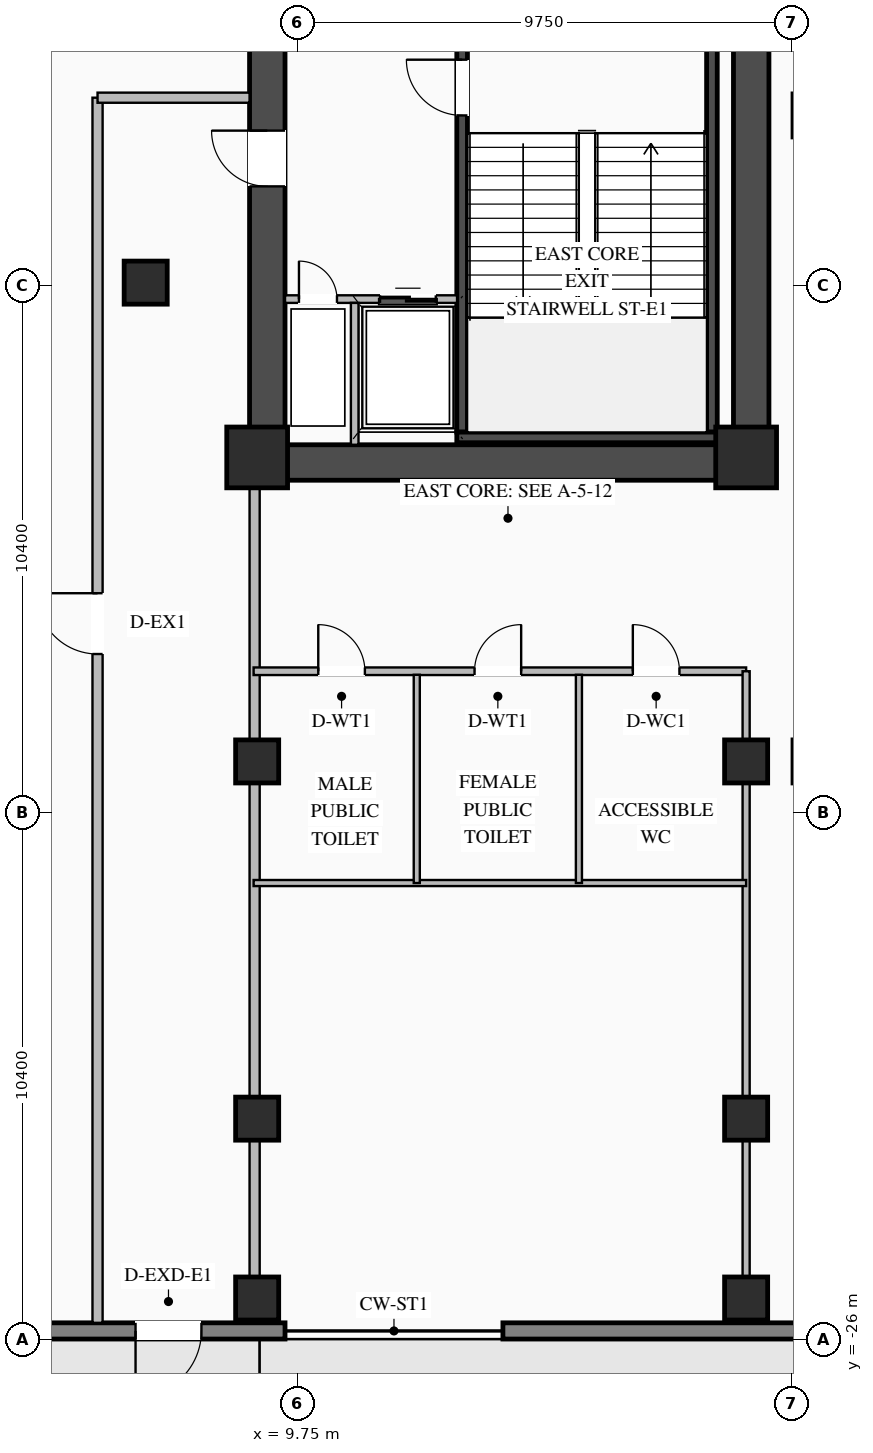
"""IFC4 building model, lengths in metres.
Left out: names, types, materials, properties, quantities, classifications, styles, units other than length and angle.
Written with IfcOpenShell. Run it as: python <this file> out.ifc"""

import sys

from ifc_helpers import new_model, si_unit, direction, frame, frame_2d, origin, origin_2d, place, context, subcontext, project, spatial, rectangle, i_section, extrude, element, fill, save


model = new_model("IFC4")
c1 = context("Model", 3, precision=1e-05, world=origin(), true_north=direction((0.0, 1.0)))
c2 = subcontext(c1, "Body", "Model", "MODEL_VIEW")
j1 = project(units=[si_unit("LENGTHUNIT", "METRE"), si_unit("PLANEANGLEUNIT", "RADIAN")], contexts=[c1])
p1 = place(None, origin())
s1 = spatial("IfcSite", under=j1, at=p1, CompositionType="ELEMENT")
p2 = place(p1, origin())
s2 = spatial("IfcBuilding", under=s1, at=p2, CompositionType="ELEMENT")
p3 = place(p2, origin())
s3 = spatial("IfcBuildingStorey", under=s2, at=p3, CompositionType="ELEMENT", Elevation=0.0)
p4 = place(p3, frame((8.8, -8.7, 0.0), z_axis=(0.0, 0.0, 1.0), x_axis=(1.0, 0.0, 0.0)))
e1 = element("IfcWall", 1, at=p4, inside=s3, PredefinedType="SHEAR", context=c2, shape_type="SweptSolid", body=[
    extrude(rectangle(XDim=10.25, YDim=0.7, at=frame_2d((5.125, 0.0))), origin(), (0.0, 0.0, 1.0), 4.85),
])
p5 = place(p3, frame((9.15, -8.35, 0.0), z_axis=(0.0, 0.0, 1.0), x_axis=(0.0, 1.0, 0.0)))
e2 = element("IfcWall", 2, at=p5, inside=s3, PredefinedType="SHEAR", context=c2, shape_type="SweptSolid", body=[
    extrude(rectangle(XDim=16.7, YDim=0.7, at=frame_2d((8.35, 0.0))), origin(), (0.0, 0.0, 1.0), 4.85),
])
p6 = place(p5, frame((5.1, 0.0, 0.0)))
e3 = element("IfcOpeningElement", 3, at=p6, cuts=e2, PredefinedType="OPENING", context=c2, shape_type="SweptSolid", body=[
    extrude(rectangle(XDim=1.1, YDim=2.08, at=frame_2d((0.55, 1.04))), frame((0.0, 0.36, 0.0), z_axis=(0.0, -1.0, 0.0), x_axis=(1.0, 0.0, 0.0)), (0.0, 0.0, 1.0), 0.72),
])
p7 = place(p3, frame((18.7, -8.35, 0.0), z_axis=(0.0, 0.0, 1.0), x_axis=(0.0, 1.0, 0.0)))
e4 = element("IfcWall", 4, at=p7, inside=s3, PredefinedType="SHEAR", context=c2, shape_type="SweptSolid", body=[
    extrude(rectangle(XDim=16.7, YDim=0.7, at=frame_2d((8.35, 0.0))), origin(), (0.0, 0.0, 1.0), 4.85),
])
p8 = place(p3, frame((12.995, -8.1, 0.0), z_axis=(0.0, 0.0, 1.0), x_axis=(0.0, 1.0, 0.0)))
e5 = element("IfcWall", 5, at=p8, inside=s3, PredefinedType="SHEAR", context=c2, shape_type="SweptSolid", body=[
    extrude(rectangle(XDim=8.2, YDim=0.21, at=frame_2d((4.1, 0.0))), origin(), (0.0, 0.0, 1.0), 4.85),
])
p9 = place(p8, frame((6.25, 0.0, 0.0)))
e6 = element("IfcOpeningElement", 6, at=p9, cuts=e5, PredefinedType="OPENING", context=c2, shape_type="SweptSolid", body=[
    extrude(rectangle(XDim=1.1, YDim=2.15, at=frame_2d((0.55, 1.075))), frame((0.0, 0.115, 0.0), z_axis=(0.0, -1.0, 0.0), x_axis=(1.0, 0.0, 0.0)), (0.0, 0.0, 1.0), 0.23),
])
p10 = place(p3, frame((17.925, -8.1, 0.0), z_axis=(0.0, 0.0, 1.0), x_axis=(0.0, 1.0, 0.0)))
e7 = element("IfcWall", 7, at=p10, inside=s3, PredefinedType="SHEAR", context=c2, shape_type="SweptSolid", body=[
    extrude(rectangle(XDim=8.2, YDim=0.21, at=frame_2d((4.1, 0.0))), origin(), (0.0, 0.0, 1.0), 4.85),
])
p11 = place(p3, frame((12.89, -8.205, 0.0), z_axis=(0.0, 0.0, 1.0), x_axis=(1.0, 0.0, 0.0)))
e8 = element("IfcWall", 8, at=p11, inside=s3, PredefinedType="SHEAR", context=c2, shape_type="SweptSolid", body=[
    extrude(rectangle(XDim=5.14, YDim=0.21, at=frame_2d((2.57, 0.0))), origin(), (0.0, 0.0, 1.0), 4.85),
])
for number, where, z_axis, x_axis in (
    (9, (8.95, -8.6, 0.0), (0.0, 0.0, 1.0), (1.0, 0.0, 0.0)),
    (10, (18.6, -8.6, 0.0), (0.0, 0.0, 1.0), (1.0, 0.0, 0.0)),
):
    element("IfcColumn", number, at=place(p3, frame(where, z_axis=z_axis, x_axis=x_axis)), inside=s3, PredefinedType="COLUMN", context=c2, shape_type="SweptSolid", body=[
        extrude(rectangle(XDim=1.2, YDim=1.2, at=origin_2d()), origin(), (0.0, 0.0, 1.0), 5.1),
    ])
for number, where, z_axis, x_axis in (
    (11, (6.75, -5.15, 0.0), (0.0, 0.0, 1.0), (1.0, 0.0, 0.0)),
    (12, (8.95, -14.6, 0.0), (0.0, 0.0, 1.0), (1.0, 0.0, 0.0)),
    (13, (18.6, -14.6, 0.0), (0.0, 0.0, 1.0), (1.0, 0.0, 0.0)),
    (14, (19.95, -14.6, 0.0), (0.0, 0.0, 1.0), (1.0, 0.0, 0.0)),
    (15, (19.95, -1.85, 0.0), (0.0, 0.0, 1.0), (1.0, 0.0, 0.0)),
    (16, (8.95, -21.65, 0.0), (0.0, 0.0, 1.0), (1.0, 0.0, 0.0)),
    (17, (18.6, -21.65, 0.0), (0.0, 0.0, 1.0), (1.0, 0.0, 0.0)),
    (18, (8.95, -25.2, 0.0), (0.0, 0.0, 1.0), (1.0, 0.0, 0.0)),
    (19, (18.6, -25.2, 0.0), (0.0, 0.0, 1.0), (1.0, 0.0, 0.0)),
):
    element("IfcColumn", number, at=place(p3, frame(where, z_axis=z_axis, x_axis=x_axis)), inside=s3, PredefinedType="COLUMN", context=c2, shape_type="SweptSolid", body=[
        extrude(i_section(OverallWidth=0.85, OverallDepth=0.85, WebThickness=0.032, FlangeThickness=0.048, at=origin_2d()), origin(), (0.0, 0.0, 1.0), 5.1),
    ])
p12 = place(p3, frame((38.68, -25.84, 0.0), z_axis=(0.0, 0.0, 1.0), x_axis=(-1.0, 0.0, 0.0)))
e20 = element("IfcWall", 20, at=p12, inside=s3, PredefinedType="STANDARD", context=c2, shape_type="SweptSolid", body=[
    extrude(rectangle(XDim=24.88, YDim=0.32, at=frame_2d((12.44, 0.0))), origin(), (0.0, 0.0, 1.0), 4.83),
])
p13 = place(p12, frame((16.63, 0.0, 0.0)))
e21 = element("IfcOpeningElement", 21, at=p13, cuts=e20, PredefinedType="OPENING", context=c2, shape_type="SweptSolid", body=[
    extrude(rectangle(XDim=1.3, YDim=2.2, at=frame_2d((0.65, 1.1))), frame((0.0, 0.17, 0.0), z_axis=(0.0, -1.0, 0.0), x_axis=(1.0, 0.0, 0.0)), (0.0, 0.0, 1.0), 0.34),
])
p14 = place(p3, frame((9.5, -25.84, 0.0), z_axis=(0.0, 0.0, 1.0), x_axis=(-1.0, 0.0, 0.0)))
e22 = element("IfcWall", 22, at=p14, inside=s3, PredefinedType="STANDARD", context=c2, shape_type="SweptSolid", body=[
    extrude(rectangle(XDim=19.0, YDim=0.32, at=frame_2d((9.5, 0.0))), origin(), (0.0, 0.0, 1.0), 4.83),
])
p15 = place(p14, frame((1.65, 0.0, 0.0)))
e23 = element("IfcOpeningElement", 23, at=p15, cuts=e22, PredefinedType="OPENING", context=c2, shape_type="SweptSolid", body=[
    extrude(rectangle(XDim=1.3, YDim=2.2, at=frame_2d((0.65, 1.1))), frame((0.0, 0.17, 0.0), z_axis=(0.0, -1.0, 0.0), x_axis=(1.0, 0.0, 0.0)), (0.0, 0.0, 1.0), 0.34),
])
p16 = place(p14, frame((5.0, 0.0, 0.0)))
e24 = element("IfcOpeningElement", 24, at=p16, cuts=e22, PredefinedType="OPENING", context=c2, shape_type="SweptSolid", body=[
    extrude(rectangle(XDim=2.4, YDim=2.4, at=frame_2d((1.2, 1.2))), frame((0.0, 0.17, 0.0), z_axis=(0.0, -1.0, 0.0), x_axis=(1.0, 0.0, 0.0)), (0.0, 0.0, 1.0), 0.34),
])
p17 = place(p14, frame((8.5, 0.0, 0.0)))
e25 = element("IfcOpeningElement", 25, at=p17, cuts=e22, PredefinedType="OPENING", context=c2, shape_type="SweptSolid", body=[
    extrude(rectangle(XDim=2.0, YDim=2.3, at=frame_2d((1.0, 1.15))), frame((0.0, 0.17, 0.0), z_axis=(0.0, -1.0, 0.0), x_axis=(1.0, 0.0, 0.0)), (0.0, 0.0, 1.0), 0.34),
])
p18 = place(p14, frame((11.6, 0.0, 0.0)))
e26 = element("IfcOpeningElement", 26, at=p18, cuts=e22, PredefinedType="OPENING", context=c2, shape_type="SweptSolid", body=[
    extrude(rectangle(XDim=2.4, YDim=2.4, at=frame_2d((1.2, 1.2))), frame((0.0, 0.17, 0.0), z_axis=(0.0, -1.0, 0.0), x_axis=(1.0, 0.0, 0.0)), (0.0, 0.0, 1.0), 0.34),
])
p19 = place(p14, frame((16.05, 0.0, 0.0)))
e27 = element("IfcOpeningElement", 27, at=p19, cuts=e22, PredefinedType="OPENING", context=c2, shape_type="SweptSolid", body=[
    extrude(rectangle(XDim=1.3, YDim=2.2, at=frame_2d((0.65, 1.1))), frame((0.0, 0.17, 0.0), z_axis=(0.0, -1.0, 0.0), x_axis=(1.0, 0.0, 0.0)), (0.0, 0.0, 1.0), 0.34),
])
p20 = place(p3, frame((9.5, -5.475, 0.0), z_axis=(0.0, 0.0, 1.0), x_axis=(1.0, 0.0, 0.0)))
e28 = element("IfcWall", 28, at=p20, inside=s3, PredefinedType="STANDARD", context=c2, shape_type="SweptSolid", body=[
    extrude(rectangle(XDim=3.395, YDim=0.15, at=frame_2d((1.698, 0.0))), origin(), (0.0, 0.0, 1.0), 4.83),
])
p21 = place(p20, frame((1.875, 0.0, 0.0)))
e29 = element("IfcOpeningElement", 29, at=p21, cuts=e28, PredefinedType="OPENING", context=c2, shape_type="SweptSolid", body=[
    extrude(rectangle(XDim=1.1, YDim=2.15, at=frame_2d((0.55, 1.075))), frame((0.0, 0.085, 0.0), z_axis=(0.0, -1.0, 0.0), x_axis=(1.0, 0.0, 0.0)), (0.0, 0.0, 1.0), 0.17),
])
p22 = place(p20, frame((0.275, 0.0, 0.0)))
e30 = element("IfcOpeningElement", 30, at=p22, cuts=e28, PredefinedType="OPENING", context=c2, shape_type="SweptSolid", body=[
    extrude(rectangle(XDim=0.75, YDim=2.05, at=frame_2d((0.375, 1.025))), frame((0.0, 0.085, 0.0), z_axis=(0.0, -1.0, 0.0), x_axis=(1.0, 0.0, 0.0)), (0.0, 0.0, 1.0), 0.17),
])
p23 = place(p3, frame((10.875, -8.35, 0.0), z_axis=(0.0, 0.0, 1.0), x_axis=(0.0, 1.0, 0.0)))
e31 = element("IfcWall", 31, at=p23, inside=s3, PredefinedType="STANDARD", context=c2, shape_type="SweptSolid", body=[
    extrude(rectangle(XDim=2.8, YDim=0.15, at=frame_2d((1.4, 0.0))), origin(), (0.0, 0.0, 1.0), 4.83),
])
p24 = place(p3, frame((5.8, -25.68, 0.0), z_axis=(0.0, 0.0, 1.0), x_axis=(0.0, 1.0, 0.0)))
e32 = element("IfcWall", 32, at=p24, inside=s3, PredefinedType="STANDARD", context=c2, shape_type="SweptSolid", body=[
    extrude(rectangle(XDim=24.18, YDim=0.2, at=frame_2d((12.09, 0.0))), origin(), (0.0, 0.0, 1.0), 4.83),
])
p25 = place(p24, frame((13.2, 0.0, 0.0)))
e33 = element("IfcOpeningElement", 33, at=p25, cuts=e32, PredefinedType="OPENING", context=c2, shape_type="SweptSolid", body=[
    extrude(rectangle(XDim=1.2, YDim=2.1, at=frame_2d((0.6, 1.05))), frame((0.0, 0.11, 0.0), z_axis=(0.0, -1.0, 0.0), x_axis=(1.0, 0.0, 0.0)), (0.0, 0.0, 1.0), 0.22),
])
p26 = place(p3, frame((8.9, -25.68, 0.0), z_axis=(0.0, 0.0, 1.0), x_axis=(0.0, 1.0, 0.0)))
e34 = element("IfcWall", 34, at=p26, inside=s3, PredefinedType="STANDARD", context=c2, shape_type="SweptSolid", body=[
    extrude(rectangle(XDim=16.63, YDim=0.2, at=frame_2d((8.315, 0.0))), origin(), (0.0, 0.0, 1.0), 4.025),
])
p27 = place(p3, frame((5.8, -1.5, 0.0), z_axis=(0.0, 0.0, 1.0), x_axis=(1.0, 0.0, 0.0)))
e35 = element("IfcWall", 35, at=p27, inside=s3, PredefinedType="STANDARD", context=c2, shape_type="SweptSolid", body=[
    extrude(rectangle(XDim=3.0, YDim=0.2, at=frame_2d((1.5, 0.0))), origin(), (0.0, 0.0, 1.0), 4.83),
])
p28 = place(p3, frame((8.88, -12.82, 0.0), z_axis=(0.0, 0.0, 1.0), x_axis=(1.0, 0.0, 0.0)))
e36 = element("IfcWall", 36, at=p28, inside=s3, PredefinedType="STANDARD", context=c2, shape_type="SweptSolid", body=[
    extrude(rectangle(XDim=9.72, YDim=0.15, at=frame_2d((4.86, 0.0))), origin(), (0.0, 0.0, 1.0), 4.83),
])
p29 = place(p28, frame((1.276, 0.0, 0.0)))
e37 = element("IfcOpeningElement", 37, at=p29, cuts=e36, PredefinedType="OPENING", context=c2, shape_type="SweptSolid", body=[
    extrude(rectangle(XDim=0.92, YDim=2.08, at=frame_2d((0.46, 1.04))), frame((0.0, 0.085, 0.0), z_axis=(0.0, -1.0, 0.0), x_axis=(1.0, 0.0, 0.0)), (0.0, 0.0, 1.0), 0.17),
])
p30 = place(p28, frame((4.36, 0.0, 0.0)))
e38 = element("IfcOpeningElement", 38, at=p30, cuts=e36, PredefinedType="OPENING", context=c2, shape_type="SweptSolid", body=[
    extrude(rectangle(XDim=0.92, YDim=2.08, at=frame_2d((0.46, 1.04))), frame((0.0, 0.085, 0.0), z_axis=(0.0, -1.0, 0.0), x_axis=(1.0, 0.0, 0.0)), (0.0, 0.0, 1.0), 0.17),
])
p31 = place(p28, frame((7.484, 0.0, 0.0)))
e39 = element("IfcOpeningElement", 39, at=p31, cuts=e36, PredefinedType="OPENING", context=c2, shape_type="SweptSolid", body=[
    extrude(rectangle(XDim=0.92, YDim=2.08, at=frame_2d((0.46, 1.04))), frame((0.0, 0.085, 0.0), z_axis=(0.0, -1.0, 0.0), x_axis=(1.0, 0.0, 0.0)), (0.0, 0.0, 1.0), 0.17),
])
p32 = place(p3, frame((18.6, -25.68, 0.0), z_axis=(0.0, 0.0, 1.0), x_axis=(0.0, 1.0, 0.0)))
e40 = element("IfcWall", 40, at=p32, inside=s3, PredefinedType="STANDARD", context=c2, shape_type="SweptSolid", body=[
    extrude(rectangle(XDim=12.86, YDim=0.14, at=frame_2d((6.43, 0.0))), origin(), (0.0, 0.0, 1.0), 4.025),
])
p33 = place(p3, frame((8.88, -17.0, 0.0), z_axis=(0.0, 0.0, 1.0), x_axis=(1.0, 0.0, 0.0)))
e41 = element("IfcWall", 41, at=p33, inside=s3, PredefinedType="STANDARD", context=c2, shape_type="SweptSolid", body=[
    extrude(rectangle(XDim=9.72, YDim=0.12, at=frame_2d((4.86, 0.0))), origin(), (0.0, 0.0, 1.0), 4.83),
])
for number, where, z_axis, x_axis in (
    (42, (12.1, -17.0, 0.0), (0.0, 0.0, 1.0), (0.0, 1.0, 0.0)),
    (43, (15.3, -17.0, 0.0), (0.0, 0.0, 1.0), (0.0, 1.0, 0.0)),
):
    element("IfcWall", number, at=place(p3, frame(where, z_axis=z_axis, x_axis=x_axis)), inside=s3, PredefinedType="STANDARD", context=c2, shape_type="SweptSolid", body=[
        extrude(rectangle(XDim=4.11, YDim=0.12, at=frame_2d((2.055, 0.0))), origin(), (0.0, 0.0, 1.0), 4.83),
    ])
p34 = place(p15, origin())
e44 = element("IfcDoor", 44, at=p34, inside=s3, OperationType="SINGLE_SWING_RIGHT", PredefinedType="DOOR", context=c2, shape_type="SweptSolid", body=[
    extrude(rectangle(XDim=1.3, YDim=2.2, at=frame_2d((0.65, 1.1))), frame((0.0, 0.025, 0.0), z_axis=(0.0, -1.0, 0.0), x_axis=(1.0, 0.0, 0.0)), (0.0, 0.0, 1.0), 0.05),
])
fill(e23, e44)
p35 = place(p9, origin())
e45 = element("IfcDoor", 45, at=p35, inside=s3, OperationType="SINGLE_SWING_RIGHT", PredefinedType="DOOR", context=c2, shape_type="SweptSolid", body=[
    extrude(rectangle(XDim=1.1, YDim=2.15, at=frame_2d((0.55, 1.075))), frame((0.0, 0.025, 0.0), z_axis=(0.0, -1.0, 0.0), x_axis=(1.0, 0.0, 0.0)), (0.0, 0.0, 1.0), 0.05),
])
fill(e6, e45)
p36 = place(p21, origin())
e46 = element("IfcDoor", 46, at=p36, inside=s3, OperationType="DOUBLE_DOOR_SLIDING", PredefinedType="DOOR", context=c2, shape_type="SweptSolid", body=[
    extrude(rectangle(XDim=1.1, YDim=2.15, at=frame_2d((0.55, 1.075))), frame((0.0, 0.025, 0.0), z_axis=(0.0, -1.0, 0.0), x_axis=(1.0, 0.0, 0.0)), (0.0, 0.0, 1.0), 0.05),
])
fill(e29, e46)
p37 = place(p22, origin())
e47 = element("IfcDoor", 47, at=p37, inside=s3, OperationType="SINGLE_SWING_LEFT", PredefinedType="DOOR", context=c2, shape_type="SweptSolid", body=[
    extrude(rectangle(XDim=0.75, YDim=2.05, at=frame_2d((0.375, 1.025))), frame((0.0, 0.025, 0.0), z_axis=(0.0, -1.0, 0.0), x_axis=(1.0, 0.0, 0.0)), (0.0, 0.0, 1.0), 0.05),
])
fill(e30, e47)
p38 = place(p6, origin())
e48 = element("IfcDoor", 48, at=p38, inside=s3, OperationType="SINGLE_SWING_RIGHT", PredefinedType="DOOR", context=c2, shape_type="SweptSolid", body=[
    extrude(rectangle(XDim=1.1, YDim=2.08, at=frame_2d((0.55, 1.04))), frame((0.0, -0.255, 0.0), z_axis=(0.0, -1.0, 0.0), x_axis=(1.0, 0.0, 0.0)), (0.0, 0.0, 1.0), 0.05),
])
fill(e3, e48)
p39 = place(p25, origin())
e49 = element("IfcDoor", 49, at=p39, inside=s3, OperationType="SINGLE_SWING_RIGHT", PredefinedType="DOOR", context=c2, shape_type="SweptSolid", body=[
    extrude(rectangle(XDim=1.2, YDim=2.1, at=frame_2d((0.6, 1.05))), frame((0.0, 0.025, 0.0), z_axis=(0.0, -1.0, 0.0), x_axis=(1.0, 0.0, 0.0)), (0.0, 0.0, 1.0), 0.05),
])
fill(e33, e49)
p40 = place(p29, origin())
e50 = element("IfcDoor", 50, at=p40, inside=s3, OperationType="SINGLE_SWING_LEFT", PredefinedType="DOOR", context=c2, shape_type="SweptSolid", body=[
    extrude(rectangle(XDim=0.92, YDim=2.08, at=frame_2d((0.46, 1.04))), frame((0.0, 0.025, 0.0), z_axis=(0.0, -1.0, 0.0), x_axis=(1.0, 0.0, 0.0)), (0.0, 0.0, 1.0), 0.05),
])
fill(e37, e50)
p41 = place(p30, origin())
e51 = element("IfcDoor", 51, at=p41, inside=s3, OperationType="SINGLE_SWING_RIGHT", PredefinedType="DOOR", context=c2, shape_type="SweptSolid", body=[
    extrude(rectangle(XDim=0.92, YDim=2.08, at=frame_2d((0.46, 1.04))), frame((0.0, 0.025, 0.0), z_axis=(0.0, -1.0, 0.0), x_axis=(1.0, 0.0, 0.0)), (0.0, 0.0, 1.0), 0.05),
])
fill(e38, e51)
p42 = place(p31, origin())
e52 = element("IfcDoor", 52, at=p42, inside=s3, OperationType="SINGLE_SWING_LEFT", PredefinedType="DOOR", context=c2, shape_type="SweptSolid", body=[
    extrude(rectangle(XDim=0.92, YDim=2.08, at=frame_2d((0.46, 1.04))), frame((0.0, 0.025, 0.0), z_axis=(0.0, -1.0, 0.0), x_axis=(1.0, 0.0, 0.0)), (0.0, 0.0, 1.0), 0.05),
])
fill(e39, e52)
save(model, sys.argv[1])
